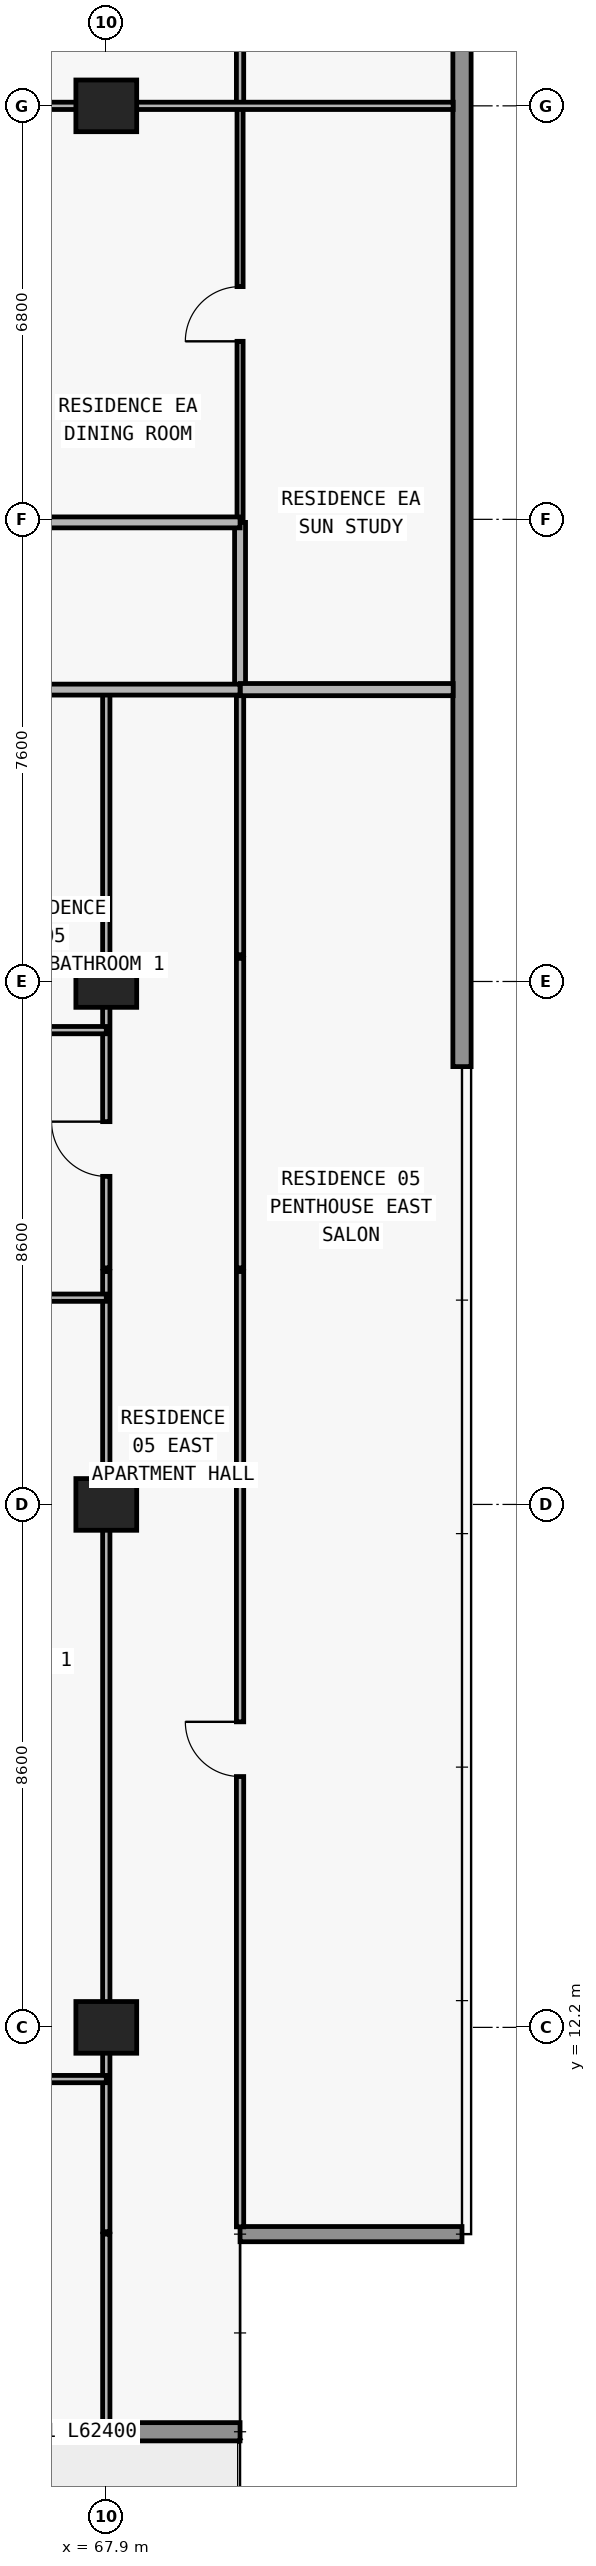
"""IFC4 building model, lengths in metres.
Left out: names, types, materials, properties, quantities, classifications, styles, units other than length and angle.
Written with IfcOpenShell. Run it as: python <this file> out.ifc"""

import sys

from ifc_helpers import new_model, si_unit, direction, frame, frame_2d, origin, origin_2d, place, context, subcontext, project, spatial, rectangle, extrude, element, fill, save


model = new_model("IFC4")
c1 = context("Model", 3, precision=1e-05, world=origin(), true_north=direction((0.0, 1.0)))
c2 = subcontext(c1, "Body", "Model", "MODEL_VIEW")
j1 = project(units=[si_unit("LENGTHUNIT", "METRE"), si_unit("PLANEANGLEUNIT", "RADIAN")], contexts=[c1])
p1 = place(None, origin())
s1 = spatial("IfcSite", under=j1, at=p1, CompositionType="ELEMENT")
p2 = place(p1, origin())
s2 = spatial("IfcBuilding", under=s1, at=p2, CompositionType="ELEMENT")
p3 = place(p2, frame((0.0, 0.0, 142.2)))
s3 = spatial("IfcBuildingStorey", under=s2, at=p3, CompositionType="ELEMENT", Elevation=142.2)
for number, where, z_axis, x_axis in (
    (1, (67.9, 12.2, 0.0), (0.0, 0.0, 1.0), (1.0, 0.0, 0.0)),
    (2, (67.9, 20.8, 0.0), (0.0, 0.0, 1.0), (1.0, 0.0, 0.0)),
    (3, (67.9, 29.4, 0.0), (0.0, 0.0, 1.0), (1.0, 0.0, 0.0)),
    (4, (67.9, 43.8, 0.0), (0.0, 0.0, 1.0), (1.0, 0.0, 0.0)),
):
    element("IfcColumn", number, at=place(p3, frame(where, z_axis=z_axis, x_axis=x_axis)), inside=s3, PredefinedType="COLUMN", context=c2, shape_type="SweptSolid", body=[
        extrude(rectangle(XDim=1.0, YDim=0.85, at=origin_2d()), origin(), (0.0, 0.0, 1.0), 3.05),
    ])
p4 = place(p3, frame((70.1, 5.55, 0.0), z_axis=(0.0, 0.0, 1.0), x_axis=(-1.0, 0.0, 0.0)))
e5 = element("IfcWall", 5, at=p4, inside=s3, PredefinedType="STANDARD", context=c2, shape_type="SweptSolid", body=[
    extrude(rectangle(XDim=62.4, YDim=0.3, at=frame_2d((31.2, 0.0))), origin(), (0.0, 0.0, 1.0), 3.05),
])
p5 = place(p4, frame((57.226, 0.0, 0.0)))
e6 = element("IfcOpeningElement", 6, at=p5, cuts=e5, PredefinedType="OPENING", context=c2, shape_type="SweptSolid", body=[
    extrude(rectangle(XDim=2.0, YDim=2.3, at=frame_2d((1.0, 1.15))), frame((0.0, 0.16, 0.0), z_axis=(0.0, -1.0, 0.0), x_axis=(1.0, 0.0, 0.0)), (0.0, 0.0, 1.0), 0.32),
])
p6 = place(p4, frame((52.926, 0.0, 0.85)))
e7 = element("IfcOpeningElement", 7, at=p6, cuts=e5, PredefinedType="OPENING", context=c2, shape_type="SweptSolid", body=[
    extrude(rectangle(XDim=2.2, YDim=1.55, at=frame_2d((1.1, 0.775))), frame((0.0, 0.16, 0.0), z_axis=(0.0, -1.0, 0.0), x_axis=(1.0, 0.0, 0.0)), (0.0, 0.0, 1.0), 0.32),
])
p7 = place(p4, frame((48.49, 0.0, 0.0)))
e8 = element("IfcOpeningElement", 8, at=p7, cuts=e5, PredefinedType="OPENING", context=c2, shape_type="SweptSolid", body=[
    extrude(rectangle(XDim=2.0, YDim=2.3, at=frame_2d((1.0, 1.15))), frame((0.0, 0.16, 0.0), z_axis=(0.0, -1.0, 0.0), x_axis=(1.0, 0.0, 0.0)), (0.0, 0.0, 1.0), 0.32),
])
p8 = place(p4, frame((44.39, 0.0, 0.85)))
e9 = element("IfcOpeningElement", 9, at=p8, cuts=e5, PredefinedType="OPENING", context=c2, shape_type="SweptSolid", body=[
    extrude(rectangle(XDim=1.8, YDim=1.55, at=frame_2d((0.9, 0.775))), frame((0.0, 0.16, 0.0), z_axis=(0.0, -1.0, 0.0), x_axis=(1.0, 0.0, 0.0)), (0.0, 0.0, 1.0), 0.32),
])
p9 = place(p4, frame((40.426, 0.0, 0.0)))
e10 = element("IfcOpeningElement", 10, at=p9, cuts=e5, PredefinedType="OPENING", context=c2, shape_type="SweptSolid", body=[
    extrude(rectangle(XDim=2.0, YDim=2.3, at=frame_2d((1.0, 1.15))), frame((0.0, 0.16, 0.0), z_axis=(0.0, -1.0, 0.0), x_axis=(1.0, 0.0, 0.0)), (0.0, 0.0, 1.0), 0.32),
])
p10 = place(p4, frame((36.126, 0.0, 0.85)))
e11 = element("IfcOpeningElement", 11, at=p10, cuts=e5, PredefinedType="OPENING", context=c2, shape_type="SweptSolid", body=[
    extrude(rectangle(XDim=2.2, YDim=1.55, at=frame_2d((1.1, 0.775))), frame((0.0, 0.16, 0.0), z_axis=(0.0, -1.0, 0.0), x_axis=(1.0, 0.0, 0.0)), (0.0, 0.0, 1.0), 0.32),
])
p11 = place(p4, frame((32.09, 0.0, 0.0)))
e12 = element("IfcOpeningElement", 12, at=p11, cuts=e5, PredefinedType="OPENING", context=c2, shape_type="SweptSolid", body=[
    extrude(rectangle(XDim=2.0, YDim=2.3, at=frame_2d((1.0, 1.15))), frame((0.0, 0.16, 0.0), z_axis=(0.0, -1.0, 0.0), x_axis=(1.0, 0.0, 0.0)), (0.0, 0.0, 1.0), 0.32),
])
p12 = place(p4, frame((28.21, 0.0, 0.65)))
e13 = element("IfcOpeningElement", 13, at=p12, cuts=e5, PredefinedType="OPENING", context=c2, shape_type="SweptSolid", body=[
    extrude(rectangle(XDim=2.6, YDim=1.85, at=frame_2d((1.3, 0.925))), frame((0.0, 0.16, 0.0), z_axis=(0.0, -1.0, 0.0), x_axis=(1.0, 0.0, 0.0)), (0.0, 0.0, 1.0), 0.32),
])
p13 = place(p4, frame((22.1, 0.0, 0.85)))
e14 = element("IfcOpeningElement", 14, at=p13, cuts=e5, PredefinedType="OPENING", context=c2, shape_type="SweptSolid", body=[
    extrude(rectangle(XDim=2.2, YDim=1.55, at=frame_2d((1.1, 0.775))), frame((0.0, 0.16, 0.0), z_axis=(0.0, -1.0, 0.0), x_axis=(1.0, 0.0, 0.0)), (0.0, 0.0, 1.0), 0.32),
])
p14 = place(p4, frame((16.09, 0.0, 0.0)))
e15 = element("IfcOpeningElement", 15, at=p14, cuts=e5, PredefinedType="OPENING", context=c2, shape_type="SweptSolid", body=[
    extrude(rectangle(XDim=2.0, YDim=2.3, at=frame_2d((1.0, 1.15))), frame((0.0, 0.16, 0.0), z_axis=(0.0, -1.0, 0.0), x_axis=(1.0, 0.0, 0.0)), (0.0, 0.0, 1.0), 0.32),
])
p15 = place(p4, frame((11.41, 0.0, 0.65)))
e16 = element("IfcOpeningElement", 16, at=p15, cuts=e5, PredefinedType="OPENING", context=c2, shape_type="SweptSolid", body=[
    extrude(rectangle(XDim=2.6, YDim=1.85, at=frame_2d((1.3, 0.925))), frame((0.0, 0.16, 0.0), z_axis=(0.0, -1.0, 0.0), x_axis=(1.0, 0.0, 0.0)), (0.0, 0.0, 1.0), 0.32),
])
p16 = place(p4, frame((5.3, 0.0, 0.85)))
e17 = element("IfcOpeningElement", 17, at=p16, cuts=e5, PredefinedType="OPENING", context=c2, shape_type="SweptSolid", body=[
    extrude(rectangle(XDim=2.2, YDim=1.55, at=frame_2d((1.1, 0.775))), frame((0.0, 0.16, 0.0), z_axis=(0.0, -1.0, 0.0), x_axis=(1.0, 0.0, 0.0)), (0.0, 0.0, 1.0), 0.32),
])
p17 = place(p3, frame((70.1, 8.8, 0.0), z_axis=(0.0, 0.0, 1.0), x_axis=(1.0, 0.0, 0.0)))
e18 = element("IfcWall", 18, at=p17, inside=s3, PredefinedType="ELEMENTEDWALL", context=c2, shape_type="SweptSolid", body=[
    extrude(rectangle(XDim=3.65, YDim=0.25, at=frame_2d((1.825, 0.0))), origin(), (0.0, 0.0, 1.0), 3.05),
])
p18 = place(p3, frame((73.75, 47.2, 0.0), z_axis=(0.0, 0.0, 1.0), x_axis=(0.0, -1.0, 0.0)))
e19 = element("IfcWall", 19, at=p18, inside=s3, PredefinedType="STANDARD", context=c2, shape_type="SweptSolid", body=[
    extrude(rectangle(XDim=19.2, YDim=0.3, at=frame_2d((9.6, 0.0))), origin(), (0.0, 0.0, 1.0), 3.05),
])
p19 = place(p3, frame((67.9, 5.695, 0.0), z_axis=(0.0, 0.0, 1.0), x_axis=(0.0, 1.0, 0.0)))
e20 = element("IfcWall", 20, at=p19, inside=s3, PredefinedType="PARTITIONING", context=c2, shape_type="SweptSolid", body=[
    extrude(rectangle(XDim=3.105, YDim=0.12, at=frame_2d((1.552, 0.0))), origin(), (0.0, 0.0, 1.0), 3.05),
])
p20 = place(p3, frame((67.9, 8.84, 0.0), z_axis=(0.0, 0.0, 1.0), x_axis=(0.0, 1.0, 0.0)))
e21 = element("IfcWall", 21, at=p20, inside=s3, PredefinedType="PARTITIONING", context=c2, shape_type="SweptSolid", body=[
    extrude(rectangle(XDim=15.79, YDim=0.12, at=frame_2d((7.895, 0.0))), origin(), (0.0, 0.0, 1.0), 2.174),
])
p21 = place(p3, frame((67.9, 24.69, 0.0), z_axis=(0.0, 0.0, 1.0), x_axis=(0.0, 1.0, 0.0)))
e22 = element("IfcWall", 22, at=p21, inside=s3, PredefinedType="PARTITIONING", context=c2, shape_type="SweptSolid", body=[
    extrude(rectangle(XDim=5.09, YDim=0.12, at=frame_2d((2.545, 0.0))), origin(), (0.0, 0.0, 1.0), 2.174),
])
p22 = place(p21, frame((1.505, 0.0, 0.0)))
e23 = element("IfcOpeningElement", 23, at=p22, cuts=e22, PredefinedType="OPENING", context=c2, shape_type="SweptSolid", body=[
    extrude(rectangle(XDim=0.9, YDim=2.124, at=frame_2d((0.45, 1.062))), frame((0.0, 0.07, 0.0), z_axis=(0.0, -1.0, 0.0), x_axis=(1.0, 0.0, 0.0)), (0.0, 0.0, 1.0), 0.14),
])
p23 = place(p3, frame((67.9, 29.84, 0.0), z_axis=(0.0, 0.0, 1.0), x_axis=(0.0, 1.0, 0.0)))
e24 = element("IfcWall", 24, at=p23, inside=s3, PredefinedType="PARTITIONING", context=c2, shape_type="SweptSolid", body=[
    extrude(rectangle(XDim=4.36, YDim=0.12, at=frame_2d((2.18, 0.0))), origin(), (0.0, 0.0, 1.0), 2.174),
])
p24 = place(p3, frame((70.1, 8.92, 0.0), z_axis=(0.0, 0.0, 1.0), x_axis=(0.0, 1.0, 0.0)))
e25 = element("IfcWall", 25, at=p24, inside=s3, PredefinedType="PARTITIONING", context=c2, shape_type="SweptSolid", body=[
    extrude(rectangle(XDim=15.71, YDim=0.12, at=frame_2d((7.855, 0.0))), origin(), (0.0, 0.0, 1.0), 3.05),
])
p25 = place(p24, frame((7.405, 0.0, 0.0)))
e26 = element("IfcOpeningElement", 26, at=p25, cuts=e25, PredefinedType="OPENING", context=c2, shape_type="SweptSolid", body=[
    extrude(rectangle(XDim=0.9, YDim=2.15, at=frame_2d((0.45, 1.075))), frame((0.0, 0.07, 0.0), z_axis=(0.0, -1.0, 0.0), x_axis=(1.0, 0.0, 0.0)), (0.0, 0.0, 1.0), 0.14),
])
p26 = place(p3, frame((70.1, 24.69, 0.0), z_axis=(0.0, 0.0, 1.0), x_axis=(0.0, 1.0, 0.0)))
e27 = element("IfcWall", 27, at=p26, inside=s3, PredefinedType="PARTITIONING", context=c2, shape_type="SweptSolid", body=[
    extrude(rectangle(XDim=5.09, YDim=0.12, at=frame_2d((2.545, 0.0))), origin(), (0.0, 0.0, 1.0), 3.05),
])
p27 = place(p3, frame((70.1, 29.84, 0.0), z_axis=(0.0, 0.0, 1.0), x_axis=(0.0, 1.0, 0.0)))
e28 = element("IfcWall", 28, at=p27, inside=s3, PredefinedType="PARTITIONING", context=c2, shape_type="SweptSolid", body=[
    extrude(rectangle(XDim=4.36, YDim=0.12, at=frame_2d((2.18, 0.0))), origin(), (0.0, 0.0, 1.0), 3.05),
])
p28 = place(p3, frame((70.1, 34.205, 0.0), z_axis=(0.0, 0.0, 1.0), x_axis=(0.0, 1.0, 0.0)))
e29 = element("IfcWall", 29, at=p28, inside=s3, PredefinedType="PARTITIONING", context=c2, shape_type="SweptSolid", body=[
    extrude(rectangle(XDim=2.745, YDim=0.18, at=frame_2d((1.373, 0.0))), origin(), (0.0, 0.0, 1.0), 3.05),
])
p29 = place(p3, frame((70.1, 36.955, 0.0), z_axis=(0.0, 0.0, 1.0), x_axis=(0.0, 1.0, 0.0)))
e30 = element("IfcWall", 30, at=p29, inside=s3, PredefinedType="MOVABLE", context=c2, shape_type="SweptSolid", body=[
    extrude(rectangle(XDim=6.845, YDim=0.1, at=frame_2d((3.422, 0.0))), origin(), (0.0, 0.0, 1.0), 3.05),
])
p30 = place(p29, frame((2.972, 0.0, 0.0)))
e31 = element("IfcOpeningElement", 31, at=p30, cuts=e30, PredefinedType="OPENING", context=c2, shape_type="SweptSolid", body=[
    extrude(rectangle(XDim=0.9, YDim=2.15, at=frame_2d((0.45, 1.075))), frame((0.0, 0.06, 0.0), z_axis=(0.0, -1.0, 0.0), x_axis=(1.0, 0.0, 0.0)), (0.0, 0.0, 1.0), 0.12),
])
p31 = place(p3, frame((70.1, 43.805, 0.0), z_axis=(0.0, 0.0, 1.0), x_axis=(0.0, 1.0, 0.0)))
e32 = element("IfcWall", 32, at=p31, inside=s3, PredefinedType="PARTITIONING", context=c2, shape_type="SweptSolid", body=[
    extrude(rectangle(XDim=3.275, YDim=0.12, at=frame_2d((1.638, 0.0))), origin(), (0.0, 0.0, 1.0), 3.05),
])
p32 = place(p31, frame((1.188, 0.0, 0.0)))
e33 = element("IfcOpeningElement", 33, at=p32, cuts=e32, PredefinedType="OPENING", context=c2, shape_type="SweptSolid", body=[
    extrude(rectangle(XDim=0.9, YDim=2.15, at=frame_2d((0.45, 1.075))), frame((0.0, 0.07, 0.0), z_axis=(0.0, -1.0, 0.0), x_axis=(1.0, 0.0, 0.0)), (0.0, 0.0, 1.0), 0.14),
])
p33 = place(p3, frame((59.55, 11.35, 0.0), z_axis=(0.0, 0.0, 1.0), x_axis=(1.0, 0.0, 0.0)))
e34 = element("IfcWall", 34, at=p33, inside=s3, PredefinedType="PARTITIONING", context=c2, shape_type="SweptSolid", body=[
    extrude(rectangle(XDim=8.35, YDim=0.12, at=frame_2d((4.175, 0.0))), origin(), (0.0, 0.0, 1.0), 3.05),
])
p34 = place(p33, frame((3.725, 0.0, 0.0)))
e35 = element("IfcOpeningElement", 35, at=p34, cuts=e34, PredefinedType="OPENING", context=c2, shape_type="SweptSolid", body=[
    extrude(rectangle(XDim=0.9, YDim=2.15, at=frame_2d((0.45, 1.075))), frame((0.0, 0.07, 0.0), z_axis=(0.0, -1.0, 0.0), x_axis=(1.0, 0.0, 0.0)), (0.0, 0.0, 1.0), 0.14),
])
p35 = place(p3, frame((59.55, 24.2, 0.0), z_axis=(0.0, 0.0, 1.0), x_axis=(1.0, 0.0, 0.0)))
e36 = element("IfcWall", 36, at=p35, inside=s3, PredefinedType="PARTITIONING", context=c2, shape_type="SweptSolid", body=[
    extrude(rectangle(XDim=8.35, YDim=0.12, at=frame_2d((4.175, 0.0))), origin(), (0.0, 0.0, 1.0), 3.05),
])
p36 = place(p35, frame((3.725, 0.0, 0.0)))
e37 = element("IfcOpeningElement", 37, at=p36, cuts=e36, PredefinedType="OPENING", context=c2, shape_type="SweptSolid", body=[
    extrude(rectangle(XDim=0.9, YDim=2.15, at=frame_2d((0.45, 1.075))), frame((0.0, 0.07, 0.0), z_axis=(0.0, -1.0, 0.0), x_axis=(1.0, 0.0, 0.0)), (0.0, 0.0, 1.0), 0.14),
])
p37 = place(p3, frame((59.55, 28.6, 0.0), z_axis=(0.0, 0.0, 1.0), x_axis=(1.0, 0.0, 0.0)))
e38 = element("IfcWall", 38, at=p37, inside=s3, PredefinedType="PARTITIONING", context=c2, shape_type="SweptSolid", body=[
    extrude(rectangle(XDim=8.35, YDim=0.12, at=frame_2d((4.175, 0.0))), origin(), (0.0, 0.0, 1.0), 3.05),
])
p38 = place(p37, frame((2.868, 0.0, 0.0)))
e39 = element("IfcOpeningElement", 39, at=p38, cuts=e38, PredefinedType="OPENING", context=c2, shape_type="SweptSolid", body=[
    extrude(rectangle(XDim=0.9, YDim=2.15, at=frame_2d((0.45, 1.075))), frame((0.0, 0.07, 0.0), z_axis=(0.0, -1.0, 0.0), x_axis=(1.0, 0.0, 0.0)), (0.0, 0.0, 1.0), 0.14),
])
p39 = place(p3, frame((59.55, 34.2, 0.0), z_axis=(0.0, 0.0, 1.0), x_axis=(1.0, 0.0, 0.0)))
e40 = element("IfcWall", 40, at=p39, inside=s3, PredefinedType="PARTITIONING", context=c2, shape_type="SweptSolid", body=[
    extrude(rectangle(XDim=10.55, YDim=0.18, at=frame_2d((5.275, 0.0))), origin(), (0.0, 0.0, 1.0), 3.05),
])
p40 = place(p3, frame((70.105, 34.2, 0.0), z_axis=(0.0, 0.0, 1.0), x_axis=(1.0, 0.0, 0.0)))
e41 = element("IfcWall", 41, at=p40, inside=s3, PredefinedType="PARTITIONING", context=c2, shape_type="SweptSolid", body=[
    extrude(rectangle(XDim=3.5, YDim=0.2, at=frame_2d((1.75, 0.0))), origin(), (0.0, 0.0, 1.0), 3.05),
])
p41 = place(p3, frame((59.955, 36.95, 0.0), z_axis=(0.0, 0.0, 1.0), x_axis=(1.0, 0.0, 0.0)))
e42 = element("IfcWall", 42, at=p41, inside=s3, PredefinedType="PARTITIONING", context=c2, shape_type="SweptSolid", body=[
    extrude(rectangle(XDim=10.145, YDim=0.18, at=frame_2d((5.073, 0.0))), origin(), (0.0, 0.0, 1.0), 3.05),
])
p42 = place(p41, frame((3.957, 0.0, 0.0)))
e43 = element("IfcOpeningElement", 43, at=p42, cuts=e42, PredefinedType="OPENING", context=c2, shape_type="SweptSolid", body=[
    extrude(rectangle(XDim=1.0, YDim=2.2, at=frame_2d((0.5, 1.1))), frame((0.0, 0.1, 0.0), z_axis=(0.0, -1.0, 0.0), x_axis=(1.0, 0.0, 0.0)), (0.0, 0.0, 1.0), 0.2),
])
p43 = place(p3, frame((59.945, 43.8, 0.0), z_axis=(0.0, 0.0, 1.0), x_axis=(1.0, 0.0, 0.0)))
e44 = element("IfcWall", 44, at=p43, inside=s3, PredefinedType="PARTITIONING", context=c2, shape_type="SweptSolid", body=[
    extrude(rectangle(XDim=13.66, YDim=0.12, at=frame_2d((6.83, 0.0))), origin(), (0.0, 0.0, 1.0), 2.339),
])
p44 = place(p43, frame((4.017, 0.0, 0.0)))
e45 = element("IfcOpeningElement", 45, at=p44, cuts=e44, PredefinedType="OPENING", context=c2, shape_type="SweptSolid", body=[
    extrude(rectangle(XDim=0.9, YDim=2.15, at=frame_2d((0.45, 1.075))), frame((0.0, 0.07, 0.0), z_axis=(0.0, -1.0, 0.0), x_axis=(1.0, 0.0, 0.0)), (0.0, 0.0, 1.0), 0.14),
])
p45 = place(p43, frame((0.702, 0.0, 0.0)))
e46 = element("IfcOpeningElement", 46, at=p45, cuts=e44, PredefinedType="OPENING", context=c2, shape_type="SweptSolid", body=[
    extrude(rectangle(XDim=0.85, YDim=2.1, at=frame_2d((0.425, 1.05))), frame((0.0, 0.07, 0.0), z_axis=(0.0, -1.0, 0.0), x_axis=(1.0, 0.0, 0.0)), (0.0, 0.0, 1.0), 0.14),
])
p46 = place(p22, origin())
e47 = element("IfcDoor", 47, at=p46, inside=s3, OperationType="SINGLE_SWING_RIGHT", PredefinedType="DOOR", context=c2, shape_type="SweptSolid", body=[
    extrude(rectangle(XDim=0.9, YDim=2.124, at=frame_2d((0.45, 1.062))), frame((0.0, 0.025, 0.0), z_axis=(0.0, -1.0, 0.0), x_axis=(1.0, 0.0, 0.0)), (0.0, 0.0, 1.0), 0.05),
])
fill(e23, e47)
p47 = place(p25, origin())
e48 = element("IfcDoor", 48, at=p47, inside=s3, OperationType="SINGLE_SWING_RIGHT", PredefinedType="DOOR", context=c2, shape_type="SweptSolid", body=[
    extrude(rectangle(XDim=0.9, YDim=2.15, at=frame_2d((0.45, 1.075))), frame((0.0, 0.025, 0.0), z_axis=(0.0, -1.0, 0.0), x_axis=(1.0, 0.0, 0.0)), (0.0, 0.0, 1.0), 0.05),
])
fill(e26, e48)
p48 = place(p30, origin())
e49 = element("IfcDoor", 49, at=p48, inside=s3, OperationType="SINGLE_SWING_LEFT", PredefinedType="DOOR", context=c2, shape_type="SweptSolid", body=[
    extrude(rectangle(XDim=0.9, YDim=2.15, at=frame_2d((0.45, 1.075))), frame((0.0, 0.025, 0.0), z_axis=(0.0, -1.0, 0.0), x_axis=(1.0, 0.0, 0.0)), (0.0, 0.0, 1.0), 0.05),
])
fill(e31, e49)
save(model, sys.argv[1])
